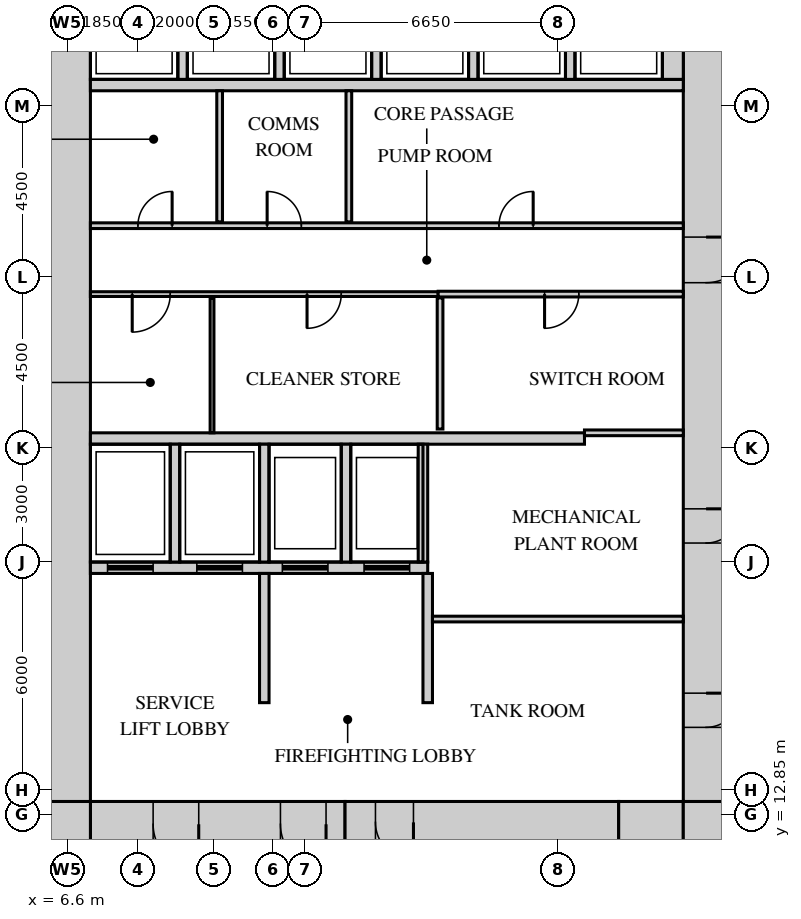
"""IFC4 building model, lengths in metres.
Left out: names, types, materials, properties, quantities, classifications, styles, units other than length and angle.
Written with IfcOpenShell. Run it as: python <this file> out.ifc"""

import sys

from ifc_helpers import new_model, si_unit, direction, frame, frame_2d, origin, place, context, subcontext, project, spatial, rectangle, extrude, source, transform, mapped, element, fill, save


model = new_model("IFC4")
c1 = context("Model", 3, precision=1e-05, world=origin(), true_north=direction((0.0, 1.0)))
c2 = subcontext(c1, "Body", "Model", "MODEL_VIEW")
j1 = project(units=[si_unit("LENGTHUNIT", "METRE"), si_unit("PLANEANGLEUNIT", "RADIAN")], contexts=[c1])
p1 = place(None, origin())
s1 = spatial("IfcSite", under=j1, at=p1, CompositionType="ELEMENT")
p2 = place(p1, origin())
s2 = spatial("IfcBuilding", under=s1, at=p2, CompositionType="ELEMENT")
p3 = place(p2, origin())
s3 = spatial("IfcBuildingStorey", under=s2, at=p3, CompositionType="ELEMENT", Elevation=0.0)
m1 = source(origin(), c2, "Body", "SweptSolid", [
    extrude(rectangle(XDim=6.7, YDim=1.2, at=frame_2d((3.35, 0.0))), origin(), (0.0, 0.0, 1.0), 7.2),
])
p4 = place(p3, frame((7.2, 12.6, 0.0), z_axis=(0.0, 0.0, 1.0), x_axis=(1.0, 0.0, 0.0)))
e1 = element("IfcWall", 1, at=p4, inside=s3, PredefinedType="SHEAR", context=c2, shape_type="MappedRepresentation", body=[
    mapped(m1, transform((0.0, 0.0, 0.0))),
])
m2 = source(origin(), c2, "Body", "SweptSolid", [
    extrude(rectangle(XDim=1.2, YDim=2.1, at=frame_2d((0.6, 1.05))), frame((0.0, 0.61, 0.0), z_axis=(0.0, -1.0, 0.0), x_axis=(1.0, 0.0, 0.0)), (0.0, 0.0, 1.0), 1.22),
])
p5 = place(p4, frame((5.0, 0.0, 0.0)))
e2 = element("IfcOpeningElement", 2, at=p5, cuts=e1, PredefinedType="OPENING", context=c2, shape_type="MappedRepresentation", body=[
    mapped(m2, transform((0.0, 0.0, 0.0))),
])
p6 = place(p4, frame((1.65, 0.0, 0.0)))
e3 = element("IfcOpeningElement", 3, at=p6, cuts=e1, PredefinedType="OPENING", context=c2, shape_type="MappedRepresentation", body=[
    mapped(m2, transform((0.0, 0.0, 0.0))),
])
m3 = source(origin(), c2, "Body", "SweptSolid", [
    extrude(rectangle(XDim=7.2, YDim=1.1, at=frame_2d((3.6, 0.0))), origin(), (0.0, 0.0, 1.0), 7.2),
])
p7 = place(p3, frame((13.9, 12.65, 0.0), z_axis=(0.0, 0.0, 1.0), x_axis=(1.0, 0.0, 0.0)))
e4 = element("IfcWall", 4, at=p7, inside=s3, PredefinedType="SHEAR", context=c2, shape_type="MappedRepresentation", body=[
    mapped(m3, transform((0.0, 0.0, 0.0))),
])
m4 = source(origin(), c2, "Body", "SweptSolid", [
    extrude(rectangle(XDim=1.0, YDim=2.1, at=frame_2d((0.5, 1.05))), frame((0.0, 0.56, 0.0), z_axis=(0.0, -1.0, 0.0), x_axis=(1.0, 0.0, 0.0)), (0.0, 0.0, 1.0), 1.12),
])
p8 = place(p7, frame((0.8, 0.0, 0.0)))
e5 = element("IfcOpeningElement", 5, at=p8, cuts=e4, PredefinedType="OPENING", context=c2, shape_type="MappedRepresentation", body=[
    mapped(m4, transform((0.0, 0.0, 0.0))),
])
m5 = source(origin(), c2, "Body", "SweptSolid", [
    extrude(rectangle(XDim=1.7, YDim=1.2, at=frame_2d((0.85, 0.0))), origin(), (0.0, 0.0, 1.0), 7.2),
])
p9 = place(p3, frame((21.1, 12.6, 0.0), z_axis=(0.0, 0.0, 1.0), x_axis=(1.0, 0.0, 0.0)))
e6 = element("IfcWall", 6, at=p9, inside=s3, PredefinedType="SHEAR", context=c2, shape_type="MappedRepresentation", body=[
    mapped(m5, transform((0.0, 0.0, 0.0))),
])
m6 = source(origin(), c2, "Body", "SweptSolid", [
    extrude(rectangle(XDim=1.2, YDim=1.2, at=frame_2d((0.6, 0.0))), origin(), (0.0, 0.0, 1.0), 7.2),
])
for number, where, z_axis, x_axis in (
    (7, (22.8, 12.6, 0.0), (0.0, 0.0, 1.0), (1.0, 0.0, 0.0)),
    (8, (6.0, 12.6, 0.0), (0.0, 0.0, 1.0), (1.0, 0.0, 0.0)),
):
    element("IfcWall", number, at=place(p3, frame(where, z_axis=z_axis, x_axis=x_axis)), inside=s3, PredefinedType="SHEAR", context=c2, shape_type="MappedRepresentation", body=[
        mapped(m6, transform((0.0, 0.0, 0.0))),
    ])
m7 = source(origin(), c2, "Body", "SweptSolid", [
    extrude(rectangle(XDim=27.6, YDim=1.2, at=frame_2d((13.8, 0.0))), origin(), (0.0, 0.0, 1.0), 7.2),
])
p10 = place(p3, frame((23.4, 13.2, 0.0), z_axis=(0.0, 0.0, 1.0), x_axis=(0.0, 1.0, 0.0)))
e9 = element("IfcWall", 9, at=p10, inside=s3, PredefinedType="SHEAR", context=c2, shape_type="MappedRepresentation", body=[
    mapped(m7, transform((0.0, 0.0, 0.0))),
])
m8 = source(origin(), c2, "Body", "SweptSolid", [
    extrude(rectangle(XDim=1.8, YDim=2.1, at=frame_2d((0.9, 1.05))), frame((0.0, 0.61, 0.0), z_axis=(0.0, -1.0, 0.0), x_axis=(1.0, 0.0, 0.0)), (0.0, 0.0, 1.0), 1.22),
])
p11 = place(p10, frame((22.4, 0.0, 0.0)))
e10 = element("IfcOpeningElement", 10, at=p11, cuts=e9, PredefinedType="OPENING", context=c2, shape_type="MappedRepresentation", body=[
    mapped(m8, transform((0.0, 0.0, 0.0))),
])
p12 = place(p10, frame((13.65, 0.0, 0.0)))
e11 = element("IfcOpeningElement", 11, at=p12, cuts=e9, PredefinedType="OPENING", context=c2, shape_type="MappedRepresentation", body=[
    mapped(m2, transform((0.0, 0.0, 0.0))),
])
m9 = source(origin(), c2, "Body", "SweptSolid", [
    extrude(rectangle(XDim=0.9, YDim=2.1, at=frame_2d((0.45, 1.05))), frame((0.0, 0.61, 0.0), z_axis=(0.0, -1.0, 0.0), x_axis=(1.0, 0.0, 0.0)), (0.0, 0.0, 1.0), 1.22),
])
p13 = place(p10, frame((1.95, 0.0, 0.0)))
e12 = element("IfcOpeningElement", 12, at=p13, cuts=e9, PredefinedType="OPENING", context=c2, shape_type="MappedRepresentation", body=[
    mapped(m9, transform((0.0, 0.0, 0.0))),
])
p14 = place(p10, frame((6.8, 0.0, 0.0)))
e13 = element("IfcOpeningElement", 13, at=p14, cuts=e9, PredefinedType="OPENING", context=c2, shape_type="MappedRepresentation", body=[
    mapped(m9, transform((0.0, 0.0, 0.0))),
])
p15 = place(p3, frame((6.6, 13.2, 0.0), z_axis=(0.0, 0.0, 1.0), x_axis=(0.0, 1.0, 0.0)))
e14 = element("IfcWall", 14, at=p15, inside=s3, PredefinedType="SHEAR", context=c2, shape_type="MappedRepresentation", body=[
    mapped(m7, transform((0.0, 0.0, 0.0))),
])
m10 = source(origin(), c2, "Body", "SweptSolid", [
    extrude(rectangle(XDim=13.0, YDim=0.3, at=frame_2d((6.5, 0.0))), origin(), (0.0, 0.0, 1.0), 7.2),
])
p16 = place(p3, frame((7.2, 22.75, 0.0), z_axis=(0.0, 0.0, 1.0), x_axis=(1.0, 0.0, 0.0)))
e15 = element("IfcWall", 15, at=p16, inside=s3, PredefinedType="STANDARD", context=c2, shape_type="MappedRepresentation", body=[
    mapped(m10, transform((0.0, 0.0, 0.0))),
])
m11 = source(origin(), c2, "Body", "SweptSolid", [
    extrude(rectangle(XDim=8.875, YDim=0.3, at=frame_2d((4.438, 0.0))), origin(), (0.0, 0.0, 1.0), 7.2),
])
p17 = place(p3, frame((7.2, 19.35, 0.0), z_axis=(0.0, 0.0, 1.0), x_axis=(1.0, 0.0, 0.0)))
e16 = element("IfcWall", 16, at=p17, inside=s3, PredefinedType="STANDARD", context=c2, shape_type="MappedRepresentation", body=[
    mapped(m11, transform((0.0, 0.0, 0.0))),
])
m12 = source(origin(), c2, "Body", "SweptSolid", [
    extrude(rectangle(XDim=1.2, YDim=2.1, at=frame_2d((0.6, 1.05))), frame((0.0, 0.16, 0.0), z_axis=(0.0, -1.0, 0.0), x_axis=(1.0, 0.0, 0.0)), (0.0, 0.0, 1.0), 0.32),
])
p18 = place(p17, frame((0.45, 0.0, 0.0)))
e17 = element("IfcOpeningElement", 17, at=p18, cuts=e16, PredefinedType="OPENING", context=c2, shape_type="MappedRepresentation", body=[
    mapped(m12, transform((0.0, 0.0, 0.0))),
])
p19 = place(p17, frame((2.8, 0.0, 0.0)))
e18 = element("IfcOpeningElement", 18, at=p19, cuts=e16, PredefinedType="OPENING", context=c2, shape_type="MappedRepresentation", body=[
    mapped(m12, transform((0.0, 0.0, 0.0))),
])
p20 = place(p17, frame((5.05, 0.0, 0.0)))
e19 = element("IfcOpeningElement", 19, at=p20, cuts=e16, PredefinedType="OPENING", context=c2, shape_type="MappedRepresentation", body=[
    mapped(m12, transform((0.0, 0.0, 0.0))),
])
p21 = place(p17, frame((7.2, 0.0, 0.0)))
e20 = element("IfcOpeningElement", 20, at=p21, cuts=e16, PredefinedType="OPENING", context=c2, shape_type="MappedRepresentation", body=[
    mapped(m12, transform((0.0, 0.0, 0.0))),
])
m13 = source(origin(), c2, "Body", "SweptSolid", [
    extrude(rectangle(XDim=15.6, YDim=0.3, at=frame_2d((7.8, 0.0))), origin(), (0.0, 0.0, 1.0), 7.2),
])
p22 = place(p3, frame((7.2, 32.05, 0.0), z_axis=(0.0, 0.0, 1.0), x_axis=(1.0, 0.0, 0.0)))
e21 = element("IfcWall", 21, at=p22, inside=s3, PredefinedType="STANDARD", context=c2, shape_type="MappedRepresentation", body=[
    mapped(m13, transform((0.0, 0.0, 0.0))),
])
m14 = source(origin(), c2, "Body", "SweptSolid", [
    extrude(rectangle(XDim=3.1, YDim=0.25, at=frame_2d((1.55, 0.0))), origin(), (0.0, 0.0, 1.0), 7.2),
])
for number, where, z_axis, x_axis in (
    (22, (9.425, 19.5, 0.0), (0.0, 0.0, 1.0), (0.0, 1.0, 0.0)),
    (23, (11.775, 19.5, 0.0), (0.0, 0.0, 1.0), (0.0, 1.0, 0.0)),
    (24, (13.925, 19.5, 0.0), (0.0, 0.0, 1.0), (0.0, 1.0, 0.0)),
    (25, (15.95, 19.5, 0.0), (0.0, 0.0, 1.0), (0.0, 1.0, 0.0)),
):
    element("IfcWall", number, at=place(p3, frame(where, z_axis=z_axis, x_axis=x_axis)), inside=s3, PredefinedType="STANDARD", context=c2, shape_type="MappedRepresentation", body=[
        mapped(m14, transform((0.0, 0.0, 0.0))),
    ])
m15 = source(origin(), c2, "Body", "SweptSolid", [
    extrude(rectangle(XDim=2.4, YDim=0.25, at=frame_2d((1.2, 0.0))), origin(), (0.0, 0.0, 1.0), 7.2),
])
for number, where, z_axis, x_axis in (
    (26, (9.625, 32.2, 0.0), (0.0, 0.0, 1.0), (0.0, 1.0, 0.0)),
    (27, (12.175, 32.2, 0.0), (0.0, 0.0, 1.0), (0.0, 1.0, 0.0)),
    (28, (14.725, 32.2, 0.0), (0.0, 0.0, 1.0), (0.0, 1.0, 0.0)),
    (29, (17.275, 32.2, 0.0), (0.0, 0.0, 1.0), (0.0, 1.0, 0.0)),
    (30, (19.825, 32.2, 0.0), (0.0, 0.0, 1.0), (0.0, 1.0, 0.0)),
):
    element("IfcWall", number, at=place(p3, frame(where, z_axis=z_axis, x_axis=x_axis)), inside=s3, PredefinedType="STANDARD", context=c2, shape_type="MappedRepresentation", body=[
        mapped(m15, transform((0.0, 0.0, 0.0))),
    ])
m16 = source(origin(), c2, "Body", "SweptSolid", [
    extrude(rectangle(XDim=2.4, YDim=0.55, at=frame_2d((1.2, 0.0))), origin(), (0.0, 0.0, 1.0), 7.2),
])
p23 = place(p3, frame((22.525, 32.2, 0.0), z_axis=(0.0, 0.0, 1.0), x_axis=(0.0, 1.0, 0.0)))
e31 = element("IfcWall", 31, at=p23, inside=s3, PredefinedType="STANDARD", context=c2, shape_type="MappedRepresentation", body=[
    mapped(m16, transform((0.0, 0.0, 0.0))),
])
m17 = source(origin(), c2, "Body", "SweptSolid", [
    extrude(rectangle(XDim=3.4, YDim=0.25, at=frame_2d((1.7, 0.0))), origin(), (0.0, 0.0, 1.0), 7.2),
])
for number, where, z_axis, x_axis in (
    (32, (16.075, 15.8, 0.0), (0.0, 0.0, 1.0), (0.0, 1.0, 0.0)),
    (33, (11.775, 15.8, 0.0), (0.0, 0.0, 1.0), (0.0, 1.0, 0.0)),
):
    element("IfcWall", number, at=place(p3, frame(where, z_axis=z_axis, x_axis=x_axis)), inside=s3, PredefinedType="STANDARD", context=c2, shape_type="MappedRepresentation", body=[
        mapped(m17, transform((0.0, 0.0, 0.0))),
    ])
m18 = source(origin(), c2, "Body", "SweptSolid", [
    extrude(rectangle(XDim=6.6, YDim=0.15, at=frame_2d((3.3, 0.0))), origin(), (0.0, 0.0, 1.0), 7.2),
])
p24 = place(p3, frame((16.2, 18.0, 0.0), z_axis=(0.0, 0.0, 1.0), x_axis=(1.0, 0.0, 0.0)))
e34 = element("IfcWall", 34, at=p24, inside=s3, PredefinedType="PARTITIONING", context=c2, shape_type="MappedRepresentation", body=[
    mapped(m18, transform((0.0, 0.0, 0.0))),
])
m19 = source(origin(), c2, "Body", "SweptSolid", [
    extrude(rectangle(XDim=3.55, YDim=0.1, at=frame_2d((1.775, 0.0))), origin(), (0.0, 0.0, 1.0), 7.2),
])
p25 = place(p3, frame((10.4, 22.9, 0.0), z_axis=(0.0, 0.0, 1.0), x_axis=(0.0, 1.0, 0.0)))
e35 = element("IfcWall", 35, at=p25, inside=s3, PredefinedType="PARTITIONING", context=c2, shape_type="MappedRepresentation", body=[
    mapped(m19, transform((0.0, 0.0, 0.0))),
])
m20 = source(origin(), c2, "Body", "SweptSolid", [
    extrude(rectangle(XDim=2.6, YDim=0.15, at=frame_2d((1.3, 0.0))), origin(), (0.0, 0.0, 1.0), 7.2),
])
p26 = place(p3, frame((20.2, 22.9, 0.0), z_axis=(0.0, 0.0, 1.0), x_axis=(1.0, 0.0, 0.0)))
e36 = element("IfcWall", 36, at=p26, inside=s3, PredefinedType="PARTITIONING", context=c2, shape_type="MappedRepresentation", body=[
    mapped(m20, transform((0.0, 0.0, 0.0))),
])
m21 = source(origin(), c2, "Body", "SweptSolid", [
    extrude(rectangle(XDim=3.45, YDim=0.15, at=frame_2d((1.725, 0.0))), origin(), (0.0, 0.0, 1.0), 7.2),
])
p27 = place(p3, frame((16.4, 23.0, 0.0), z_axis=(0.0, 0.0, 1.0), x_axis=(0.0, 1.0, 0.0)))
e37 = element("IfcWall", 37, at=p27, inside=s3, PredefinedType="PARTITIONING", context=c2, shape_type="MappedRepresentation", body=[
    mapped(m21, transform((0.0, 0.0, 0.0))),
])
m22 = source(origin(), c2, "Body", "SweptSolid", [
    extrude(rectangle(XDim=9.15, YDim=0.125, at=frame_2d((4.575, 0.0))), origin(), (0.0, 0.0, 1.0), 7.2),
])
p28 = place(p3, frame((7.2, 26.55, 0.0), z_axis=(0.0, 0.0, 1.0), x_axis=(1.0, 0.0, 0.0)))
e38 = element("IfcWall", 38, at=p28, inside=s3, PredefinedType="PARTITIONING", context=c2, shape_type="MappedRepresentation", body=[
    mapped(m22, transform((0.0, 0.0, 0.0))),
])
m23 = source(origin(), c2, "Body", "SweptSolid", [
    extrude(rectangle(XDim=1.0, YDim=2.1, at=frame_2d((0.5, 1.05))), frame((0.0, 0.073, 0.0), z_axis=(0.0, -1.0, 0.0), x_axis=(1.0, 0.0, 0.0)), (0.0, 0.0, 1.0), 0.145),
])
p29 = place(p28, frame((1.1, 0.0, 0.0)))
e39 = element("IfcOpeningElement", 39, at=p29, cuts=e38, PredefinedType="OPENING", context=c2, shape_type="MappedRepresentation", body=[
    mapped(m23, transform((0.0, 0.0, 0.0))),
])
m24 = source(origin(), c2, "Body", "SweptSolid", [
    extrude(rectangle(XDim=0.9, YDim=2.1, at=frame_2d((0.45, 1.05))), frame((0.0, 0.073, 0.0), z_axis=(0.0, -1.0, 0.0), x_axis=(1.0, 0.0, 0.0)), (0.0, 0.0, 1.0), 0.145),
])
p30 = place(p28, frame((5.7, 0.0, 0.0)))
e40 = element("IfcOpeningElement", 40, at=p30, cuts=e38, PredefinedType="OPENING", context=c2, shape_type="MappedRepresentation", body=[
    mapped(m24, transform((0.0, 0.0, 0.0))),
])
m25 = source(origin(), c2, "Body", "SweptSolid", [
    extrude(rectangle(XDim=6.45, YDim=0.15, at=frame_2d((3.225, 0.0))), origin(), (0.0, 0.0, 1.0), 7.2),
])
p31 = place(p3, frame((16.35, 26.55, 0.0), z_axis=(0.0, 0.0, 1.0), x_axis=(1.0, 0.0, 0.0)))
e41 = element("IfcWall", 41, at=p31, inside=s3, PredefinedType="PARTITIONING", context=c2, shape_type="MappedRepresentation", body=[
    mapped(m25, transform((0.0, 0.0, 0.0))),
])
m26 = source(origin(), c2, "Body", "SweptSolid", [
    extrude(rectangle(XDim=0.9, YDim=2.1, at=frame_2d((0.45, 1.05))), frame((0.0, 0.085, 0.0), z_axis=(0.0, -1.0, 0.0), x_axis=(1.0, 0.0, 0.0)), (0.0, 0.0, 1.0), 0.17),
])
p32 = place(p31, frame((2.8, 0.0, 0.0)))
e42 = element("IfcOpeningElement", 42, at=p32, cuts=e41, PredefinedType="OPENING", context=c2, shape_type="MappedRepresentation", body=[
    mapped(m26, transform((0.0, 0.0, 0.0))),
])
m27 = source(origin(), c2, "Body", "SweptSolid", [
    extrude(rectangle(XDim=15.6, YDim=0.15, at=frame_2d((7.8, 0.0))), origin(), (0.0, 0.0, 1.0), 7.2),
])
p33 = place(p3, frame((7.2, 28.35, 0.0), z_axis=(0.0, 0.0, 1.0), x_axis=(1.0, 0.0, 0.0)))
e43 = element("IfcWall", 43, at=p33, inside=s3, PredefinedType="PARTITIONING", context=c2, shape_type="MappedRepresentation", body=[
    mapped(m27, transform((0.0, 0.0, 0.0))),
])
p34 = place(p33, frame((1.25, 0.0, 0.0)))
e44 = element("IfcOpeningElement", 44, at=p34, cuts=e43, PredefinedType="OPENING", context=c2, shape_type="MappedRepresentation", body=[
    mapped(m26, transform((0.0, 0.0, 0.0))),
])
p35 = place(p33, frame((4.65, 0.0, 0.0)))
e45 = element("IfcOpeningElement", 45, at=p35, cuts=e43, PredefinedType="OPENING", context=c2, shape_type="MappedRepresentation", body=[
    mapped(m26, transform((0.0, 0.0, 0.0))),
])
p36 = place(p33, frame((10.75, 0.0, 0.0)))
e46 = element("IfcOpeningElement", 46, at=p36, cuts=e43, PredefinedType="OPENING", context=c2, shape_type="MappedRepresentation", body=[
    mapped(m26, transform((0.0, 0.0, 0.0))),
])
for number, where, z_axis, x_axis in (
    (47, (10.6, 28.45, 0.0), (0.0, 0.0, 1.0), (0.0, 1.0, 0.0)),
    (48, (14.0, 28.45, 0.0), (0.0, 0.0, 1.0), (0.0, 1.0, 0.0)),
):
    element("IfcWall", number, at=place(p3, frame(where, z_axis=z_axis, x_axis=x_axis)), inside=s3, PredefinedType="PARTITIONING", context=c2, shape_type="MappedRepresentation", body=[
        mapped(m21, transform((0.0, 0.0, 0.0))),
    ])
m28 = source(origin(), c2, "Body", "SweptSolid", [
    extrude(rectangle(XDim=1.2, YDim=2.1, at=frame_2d((0.6, 1.05))), frame((0.0, 0.55, 0.0), z_axis=(0.0, -1.0, 0.0), x_axis=(1.0, 0.0, 0.0)), (0.0, 0.0, 1.0), 1.1),
])
p37 = place(p12, origin())
e49 = element("IfcDoor", 49, at=p37, inside=s3, OperationType="SINGLE_SWING_RIGHT", PredefinedType="DOOR", context=c2, shape_type="MappedRepresentation", body=[
    mapped(m28, transform((0.0, 0.0, 0.0))),
])
fill(e11, e49)
m29 = source(origin(), c2, "Body", "SweptSolid", [
    extrude(rectangle(XDim=0.9, YDim=2.1, at=frame_2d((0.45, 1.05))), frame((0.0, 0.025, 0.0), z_axis=(0.0, -1.0, 0.0), x_axis=(1.0, 0.0, 0.0)), (0.0, 0.0, 1.0), 0.05),
])
p38 = place(p34, origin())
e50 = element("IfcDoor", 50, at=p38, inside=s3, OperationType="SINGLE_SWING_LEFT", PredefinedType="DOOR", context=c2, shape_type="MappedRepresentation", body=[
    mapped(m29, transform((0.0, 0.0, 0.0))),
])
fill(e44, e50)
p39 = place(p35, origin())
e51 = element("IfcDoor", 51, at=p39, inside=s3, OperationType="SINGLE_SWING_RIGHT", PredefinedType="DOOR", context=c2, shape_type="MappedRepresentation", body=[
    mapped(m29, transform((0.0, 0.0, 0.0))),
])
fill(e45, e51)
p40 = place(p36, origin())
e52 = element("IfcDoor", 52, at=p40, inside=s3, OperationType="SINGLE_SWING_LEFT", PredefinedType="DOOR", context=c2, shape_type="MappedRepresentation", body=[
    mapped(m29, transform((0.0, 0.0, 0.0))),
])
fill(e46, e52)
m30 = source(origin(), c2, "Body", "SweptSolid", [
    extrude(rectangle(XDim=1.0, YDim=2.1, at=frame_2d((0.5, 1.05))), frame((0.0, 0.025, 0.0), z_axis=(0.0, -1.0, 0.0), x_axis=(1.0, 0.0, 0.0)), (0.0, 0.0, 1.0), 0.05),
])
p41 = place(p29, origin())
e53 = element("IfcDoor", 53, at=p41, inside=s3, OperationType="SINGLE_SWING_LEFT", PredefinedType="DOOR", context=c2, shape_type="MappedRepresentation", body=[
    mapped(m30, transform((0.0, 0.0, 0.0))),
])
fill(e39, e53)
p42 = place(p30, origin())
e54 = element("IfcDoor", 54, at=p42, inside=s3, OperationType="SINGLE_SWING_LEFT", PredefinedType="DOOR", context=c2, shape_type="MappedRepresentation", body=[
    mapped(m29, transform((0.0, 0.0, 0.0))),
])
fill(e40, e54)
p43 = place(p32, origin())
e55 = element("IfcDoor", 55, at=p43, inside=s3, OperationType="SINGLE_SWING_LEFT", PredefinedType="DOOR", context=c2, shape_type="MappedRepresentation", body=[
    mapped(m29, transform((0.0, 0.0, 0.0))),
])
fill(e42, e55)
m31 = source(origin(), c2, "Body", "SweptSolid", [
    extrude(rectangle(XDim=0.9, YDim=2.1, at=frame_2d((0.45, 1.05))), frame((0.0, 0.55, 0.0), z_axis=(0.0, -1.0, 0.0), x_axis=(1.0, 0.0, 0.0)), (0.0, 0.0, 1.0), 1.1),
])
p44 = place(p13, origin())
e56 = element("IfcDoor", 56, at=p44, inside=s3, OperationType="SINGLE_SWING_RIGHT", PredefinedType="DOOR", context=c2, shape_type="MappedRepresentation", body=[
    mapped(m31, transform((0.0, 0.0, 0.0))),
])
fill(e12, e56)
p45 = place(p14, origin())
e57 = element("IfcDoor", 57, at=p45, inside=s3, OperationType="SINGLE_SWING_RIGHT", PredefinedType="DOOR", context=c2, shape_type="MappedRepresentation", body=[
    mapped(m31, transform((0.0, 0.0, 0.0))),
])
fill(e13, e57)
p46 = place(p5, origin())
e58 = element("IfcDoor", 58, at=p46, inside=s3, OperationType="SINGLE_SWING_RIGHT", PredefinedType="DOOR", context=c2, shape_type="MappedRepresentation", body=[
    mapped(m28, transform((0.0, 0.0, 0.0))),
])
fill(e2, e58)
p47 = place(p6, origin())
e59 = element("IfcDoor", 59, at=p47, inside=s3, OperationType="SINGLE_SWING_RIGHT", PredefinedType="DOOR", context=c2, shape_type="MappedRepresentation", body=[
    mapped(m28, transform((0.0, 0.0, 0.0))),
])
fill(e3, e59)
m32 = source(origin(), c2, "Body", "SweptSolid", [
    extrude(rectangle(XDim=1.0, YDim=2.1, at=frame_2d((0.5, 1.05))), frame((0.0, 0.5, 0.0), z_axis=(0.0, -1.0, 0.0), x_axis=(1.0, 0.0, 0.0)), (0.0, 0.0, 1.0), 1.0),
])
p48 = place(p8, origin())
e60 = element("IfcDoor", 60, at=p48, inside=s3, OperationType="SINGLE_SWING_RIGHT", PredefinedType="DOOR", context=c2, shape_type="MappedRepresentation", body=[
    mapped(m32, transform((0.0, 0.0, 0.0))),
])
fill(e5, e60)
m33 = source(origin(), c2, "Body", "SweptSolid", [
    extrude(rectangle(XDim=1.2, YDim=2.1, at=frame_2d((0.6, 1.05))), frame((0.0, 0.025, 0.0), z_axis=(0.0, -1.0, 0.0), x_axis=(1.0, 0.0, 0.0)), (0.0, 0.0, 1.0), 0.05),
])
p49 = place(p18, origin())
e61 = element("IfcDoor", 61, at=p49, inside=s3, OperationType="DOUBLE_DOOR_SLIDING", PredefinedType="DOOR", context=c2, shape_type="MappedRepresentation", body=[
    mapped(m33, transform((0.0, 0.0, 0.0))),
])
fill(e17, e61)
p50 = place(p19, origin())
e62 = element("IfcDoor", 62, at=p50, inside=s3, OperationType="DOUBLE_DOOR_SLIDING", PredefinedType="DOOR", context=c2, shape_type="MappedRepresentation", body=[
    mapped(m33, transform((0.0, 0.0, 0.0))),
])
fill(e18, e62)
p51 = place(p20, origin())
e63 = element("IfcDoor", 63, at=p51, inside=s3, OperationType="DOUBLE_DOOR_SLIDING", PredefinedType="DOOR", context=c2, shape_type="MappedRepresentation", body=[
    mapped(m33, transform((0.0, 0.0, 0.0))),
])
fill(e19, e63)
p52 = place(p21, origin())
e64 = element("IfcDoor", 64, at=p52, inside=s3, OperationType="DOUBLE_DOOR_SLIDING", PredefinedType="DOOR", context=c2, shape_type="MappedRepresentation", body=[
    mapped(m33, transform((0.0, 0.0, 0.0))),
])
fill(e20, e64)
save(model, sys.argv[1])
